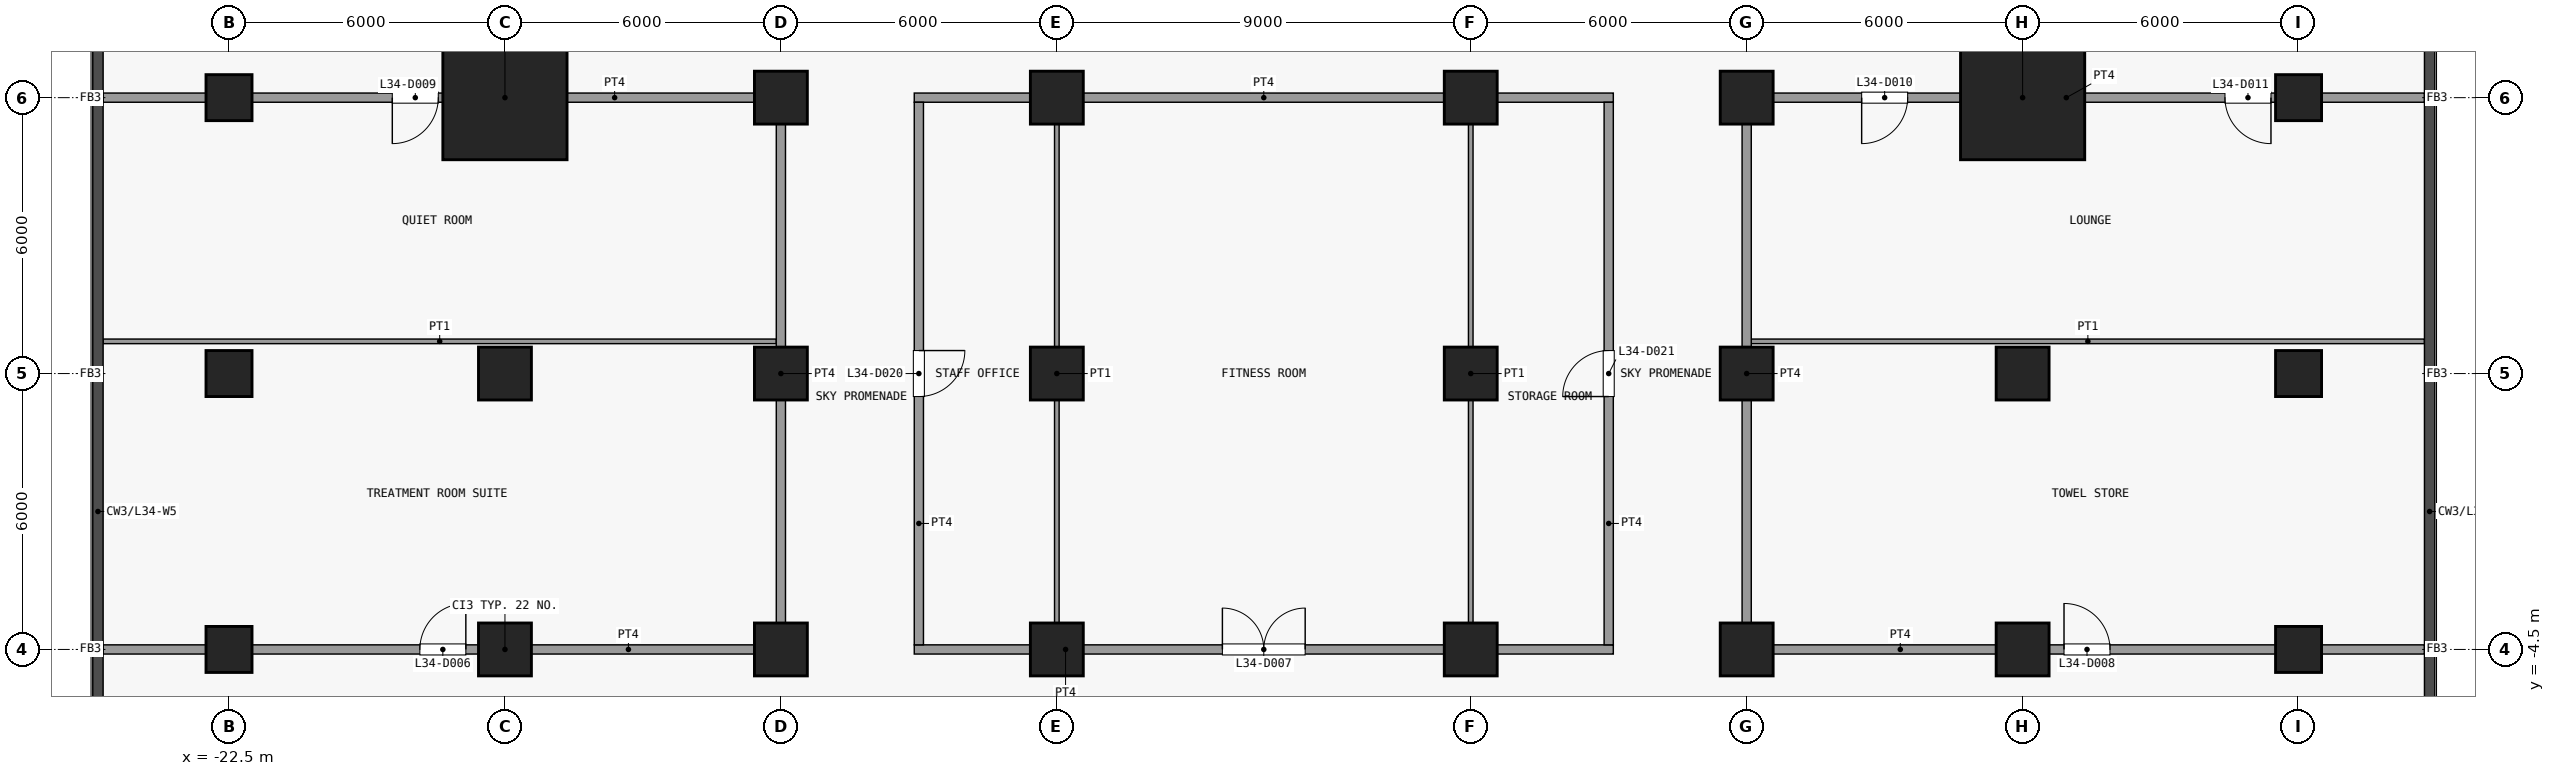
"""IFC4 building model, lengths in metres.
Left out: names, types, materials, properties, quantities, classifications, styles, units other than length and angle.
Written with IfcOpenShell. Run it as: python <this file> out.ifc"""

import sys

from ifc_helpers import new_model, si_unit, direction, frame, frame_2d, origin, origin_2d, place, context, subcontext, project, spatial, rectangle, extrude, element, fill, save


model = new_model("IFC4")
c1 = context("Model", 3, precision=1e-05, world=origin(), true_north=direction((0.0, 1.0)))
c2 = subcontext(c1, "Body", "Model", "MODEL_VIEW")
j1 = project(units=[si_unit("LENGTHUNIT", "METRE"), si_unit("PLANEANGLEUNIT", "RADIAN")], contexts=[c1])
p1 = place(None, origin())
s1 = spatial("IfcSite", under=j1, at=p1, CompositionType="ELEMENT")
p2 = place(p1, origin())
s2 = spatial("IfcBuilding", under=s1, at=p2, CompositionType="ELEMENT")
p3 = place(p2, frame((0.0, 0.0, 138.9)))
s3 = spatial("IfcBuildingStorey", under=s2, at=p3, CompositionType="ELEMENT", Elevation=138.9)
for number, where, z_axis, x_axis in (
    (1, (-22.5, -4.5, 0.0), (0.0, 0.0, 1.0), (1.0, 0.0, 0.0)),
    (2, (-22.5, 1.5, 0.0), (0.0, 0.0, 1.0), (1.0, 0.0, 0.0)),
    (3, (-22.5, 7.5, 0.0), (0.0, 0.0, 1.0), (1.0, 0.0, 0.0)),
):
    element("IfcColumn", number, at=place(p3, frame(where, z_axis=z_axis, x_axis=x_axis)), inside=s3, PredefinedType="COLUMN", context=c2, shape_type="SweptSolid", body=[
        extrude(rectangle(XDim=1.0, YDim=1.0, at=origin_2d()), origin(), (0.0, 0.0, 1.0), 5.0),
    ])
for number, where, z_axis, x_axis in (
    (4, (-16.5, -4.5, 0.0), (0.0, 0.0, 1.0), (1.0, 0.0, 0.0)),
    (5, (-16.5, 1.5, 0.0), (0.0, 0.0, 1.0), (1.0, 0.0, 0.0)),
):
    element("IfcColumn", number, at=place(p3, frame(where, z_axis=z_axis, x_axis=x_axis)), inside=s3, PredefinedType="COLUMN", context=c2, shape_type="SweptSolid", body=[
        extrude(rectangle(XDim=1.15, YDim=1.15, at=origin_2d()), origin(), (0.0, 0.0, 1.0), 5.0),
    ])
p4 = place(p3, frame((-16.5, 7.5, 0.0), z_axis=(0.0, 0.0, 1.0), x_axis=(1.0, 0.0, 0.0)))
e6 = element("IfcColumn", 6, at=p4, inside=s3, PredefinedType="COLUMN", context=c2, shape_type="SweptSolid", body=[
    extrude(rectangle(XDim=2.7, YDim=2.7, at=origin_2d()), origin(), (0.0, 0.0, 1.0), 5.0),
])
for number, where, z_axis, x_axis in (
    (7, (-10.5, -4.5, 0.0), (0.0, 0.0, 1.0), (1.0, 0.0, 0.0)),
    (8, (-10.5, 1.5, 0.0), (0.0, 0.0, 1.0), (1.0, 0.0, 0.0)),
    (9, (-10.5, 7.5, 0.0), (0.0, 0.0, 1.0), (1.0, 0.0, 0.0)),
    (10, (-4.5, -4.5, 0.0), (0.0, 0.0, 1.0), (1.0, 0.0, 0.0)),
    (11, (-4.5, 1.5, 0.0), (0.0, 0.0, 1.0), (1.0, 0.0, 0.0)),
    (12, (-4.5, 7.5, 0.0), (0.0, 0.0, 1.0), (1.0, 0.0, 0.0)),
    (13, (4.5, -4.5, 0.0), (0.0, 0.0, 1.0), (1.0, 0.0, 0.0)),
    (14, (4.5, 1.5, 0.0), (0.0, 0.0, 1.0), (1.0, 0.0, 0.0)),
    (15, (4.5, 7.5, 0.0), (0.0, 0.0, 1.0), (1.0, 0.0, 0.0)),
    (16, (10.5, -4.5, 0.0), (0.0, 0.0, 1.0), (1.0, 0.0, 0.0)),
    (17, (10.5, 1.5, 0.0), (0.0, 0.0, 1.0), (1.0, 0.0, 0.0)),
    (18, (10.5, 7.5, 0.0), (0.0, 0.0, 1.0), (1.0, 0.0, 0.0)),
    (19, (16.5, -4.5, 0.0), (0.0, 0.0, 1.0), (1.0, 0.0, 0.0)),
    (20, (16.5, 1.5, 0.0), (0.0, 0.0, 1.0), (1.0, 0.0, 0.0)),
):
    element("IfcColumn", number, at=place(p3, frame(where, z_axis=z_axis, x_axis=x_axis)), inside=s3, PredefinedType="COLUMN", context=c2, shape_type="SweptSolid", body=[
        extrude(rectangle(XDim=1.15, YDim=1.15, at=origin_2d()), origin(), (0.0, 0.0, 1.0), 5.0),
    ])
p5 = place(p3, frame((16.5, 7.5, 0.0), z_axis=(0.0, 0.0, 1.0), x_axis=(1.0, 0.0, 0.0)))
e21 = element("IfcColumn", 21, at=p5, inside=s3, PredefinedType="COLUMN", context=c2, shape_type="SweptSolid", body=[
    extrude(rectangle(XDim=2.7, YDim=2.7, at=origin_2d()), origin(), (0.0, 0.0, 1.0), 5.0),
])
for number, where, z_axis, x_axis in (
    (22, (22.5, -4.5, 0.0), (0.0, 0.0, 1.0), (1.0, 0.0, 0.0)),
    (23, (22.5, 1.5, 0.0), (0.0, 0.0, 1.0), (1.0, 0.0, 0.0)),
    (24, (22.5, 7.5, 0.0), (0.0, 0.0, 1.0), (1.0, 0.0, 0.0)),
):
    element("IfcColumn", number, at=place(p3, frame(where, z_axis=z_axis, x_axis=x_axis)), inside=s3, PredefinedType="COLUMN", context=c2, shape_type="SweptSolid", body=[
        extrude(rectangle(XDim=1.0, YDim=1.0, at=origin_2d()), origin(), (0.0, 0.0, 1.0), 5.0),
    ])
p6 = place(p3, frame((-25.238, -4.5, 0.0), z_axis=(0.0, 0.0, 1.0), x_axis=(1.0, 0.0, 0.0)))
e25 = element("IfcWall", 25, at=p6, inside=s3, PredefinedType="PARTITIONING", context=c2, shape_type="SweptSolid", body=[
    extrude(rectangle(XDim=14.838, YDim=0.2, at=frame_2d((7.419, 0.0))), origin(), (0.0, 0.0, 1.0), 4.55),
])
p7 = place(p6, frame((6.887, 0.0, 0.0)))
e26 = element("IfcOpeningElement", 26, at=p7, cuts=e25, PredefinedType="OPENING", context=c2, shape_type="SweptSolid", body=[
    extrude(rectangle(XDim=1.0, YDim=2.1, at=frame_2d((0.5, 1.05))), frame((0.0, 0.11, 0.0), z_axis=(0.0, -1.0, 0.0), x_axis=(1.0, 0.0, 0.0)), (0.0, 0.0, 1.0), 0.22),
])
p8 = place(p3, frame((-7.6, -4.5, 0.0), z_axis=(0.0, 0.0, 1.0), x_axis=(1.0, 0.0, 0.0)))
e27 = element("IfcWall", 27, at=p8, inside=s3, PredefinedType="PARTITIONING", context=c2, shape_type="SweptSolid", body=[
    extrude(rectangle(XDim=15.2, YDim=0.2, at=frame_2d((7.6, 0.0))), origin(), (0.0, 0.0, 1.0), 4.55),
])
p9 = place(p8, frame((6.7, 0.0, 0.0)))
e28 = element("IfcOpeningElement", 28, at=p9, cuts=e27, PredefinedType="OPENING", context=c2, shape_type="SweptSolid", body=[
    extrude(rectangle(XDim=1.8, YDim=2.1, at=frame_2d((0.9, 1.05))), frame((0.0, 0.11, 0.0), z_axis=(0.0, -1.0, 0.0), x_axis=(1.0, 0.0, 0.0)), (0.0, 0.0, 1.0), 0.22),
])
p10 = place(p3, frame((10.4, -4.5, 0.0), z_axis=(0.0, 0.0, 1.0), x_axis=(1.0, 0.0, 0.0)))
e29 = element("IfcWall", 29, at=p10, inside=s3, PredefinedType="PARTITIONING", context=c2, shape_type="SweptSolid", body=[
    extrude(rectangle(XDim=14.838, YDim=0.2, at=frame_2d((7.419, 0.0))), origin(), (0.0, 0.0, 1.0), 4.55),
])
p11 = place(p10, frame((7.0, 0.0, 0.0)))
e30 = element("IfcOpeningElement", 30, at=p11, cuts=e29, PredefinedType="OPENING", context=c2, shape_type="SweptSolid", body=[
    extrude(rectangle(XDim=1.0, YDim=2.1, at=frame_2d((0.5, 1.05))), frame((0.0, 0.11, 0.0), z_axis=(0.0, -1.0, 0.0), x_axis=(1.0, 0.0, 0.0)), (0.0, 0.0, 1.0), 0.22),
])
for number, where, z_axis, x_axis in (
    (31, (-25.238, 2.2, 0.0), (0.0, 0.0, 1.0), (1.0, 0.0, 0.0)),
    (32, (10.6, 2.2, 0.0), (0.0, 0.0, 1.0), (1.0, 0.0, 0.0)),
):
    element("IfcWall", number, at=place(p3, frame(where, z_axis=z_axis, x_axis=x_axis)), inside=s3, PredefinedType="PARTITIONING", context=c2, shape_type="SweptSolid", body=[
        extrude(rectangle(XDim=14.637, YDim=0.1, at=frame_2d((7.319, 0.0))), origin(), (0.0, 0.0, 1.0), 4.55),
    ])
p12 = place(p3, frame((-25.238, 7.5, 0.0), z_axis=(0.0, 0.0, 1.0), x_axis=(1.0, 0.0, 0.0)))
e33 = element("IfcWall", 33, at=p12, inside=s3, PredefinedType="PARTITIONING", context=c2, shape_type="SweptSolid", body=[
    extrude(rectangle(XDim=14.838, YDim=0.2, at=frame_2d((7.419, 0.0))), origin(), (0.0, 0.0, 1.0), 4.55),
])
p13 = place(p12, frame((6.288, 0.0, 0.0)))
e34 = element("IfcOpeningElement", 34, at=p13, cuts=e33, PredefinedType="OPENING", context=c2, shape_type="SweptSolid", body=[
    extrude(rectangle(XDim=1.0, YDim=2.1, at=frame_2d((0.5, 1.05))), frame((0.0, 0.11, 0.0), z_axis=(0.0, -1.0, 0.0), x_axis=(1.0, 0.0, 0.0)), (0.0, 0.0, 1.0), 0.22),
])
p14 = place(p3, frame((-7.6, 7.5, 0.0), z_axis=(0.0, 0.0, 1.0), x_axis=(1.0, 0.0, 0.0)))
e35 = element("IfcWall", 35, at=p14, inside=s3, PredefinedType="PARTITIONING", context=c2, shape_type="SweptSolid", body=[
    extrude(rectangle(XDim=15.2, YDim=0.2, at=frame_2d((7.6, 0.0))), origin(), (0.0, 0.0, 1.0), 4.55),
])
p15 = place(p3, frame((10.4, 7.5, 0.0), z_axis=(0.0, 0.0, 1.0), x_axis=(1.0, 0.0, 0.0)))
e36 = element("IfcWall", 36, at=p15, inside=s3, PredefinedType="PARTITIONING", context=c2, shape_type="SweptSolid", body=[
    extrude(rectangle(XDim=14.838, YDim=0.2, at=frame_2d((7.419, 0.0))), origin(), (0.0, 0.0, 1.0), 4.55),
])
p16 = place(p15, frame((2.6, 0.0, 0.0)))
e37 = element("IfcOpeningElement", 37, at=p16, cuts=e36, PredefinedType="OPENING", context=c2, shape_type="SweptSolid", body=[
    extrude(rectangle(XDim=1.0, YDim=2.1, at=frame_2d((0.5, 1.05))), frame((0.0, 0.11, 0.0), z_axis=(0.0, -1.0, 0.0), x_axis=(1.0, 0.0, 0.0)), (0.0, 0.0, 1.0), 0.22),
])
p17 = place(p15, frame((10.5, 0.0, 0.0)))
e38 = element("IfcOpeningElement", 38, at=p17, cuts=e36, PredefinedType="OPENING", context=c2, shape_type="SweptSolid", body=[
    extrude(rectangle(XDim=1.0, YDim=2.1, at=frame_2d((0.5, 1.05))), frame((0.0, 0.11, 0.0), z_axis=(0.0, -1.0, 0.0), x_axis=(1.0, 0.0, 0.0)), (0.0, 0.0, 1.0), 0.22),
])
p18 = place(p3, frame((-10.5, -4.4, 0.0), z_axis=(0.0, 0.0, 1.0), x_axis=(0.0, 1.0, 0.0)))
e39 = element("IfcWall", 39, at=p18, inside=s3, PredefinedType="PARTITIONING", context=c2, shape_type="SweptSolid", body=[
    extrude(rectangle(XDim=11.8, YDim=0.2, at=frame_2d((5.9, 0.0))), origin(), (0.0, 0.0, 1.0), 4.55),
])
p19 = place(p3, frame((-7.5, -4.4, 0.0), z_axis=(0.0, 0.0, 1.0), x_axis=(0.0, 1.0, 0.0)))
e40 = element("IfcWall", 40, at=p19, inside=s3, PredefinedType="PARTITIONING", context=c2, shape_type="SweptSolid", body=[
    extrude(rectangle(XDim=11.8, YDim=0.2, at=frame_2d((5.9, 0.0))), origin(), (0.0, 0.0, 1.0), 4.55),
])
p20 = place(p19, frame((5.4, 0.0, 0.0)))
e41 = element("IfcOpeningElement", 41, at=p20, cuts=e40, PredefinedType="OPENING", context=c2, shape_type="SweptSolid", body=[
    extrude(rectangle(XDim=1.0, YDim=2.1, at=frame_2d((0.5, 1.05))), frame((0.0, 0.11, 0.0), z_axis=(0.0, -1.0, 0.0), x_axis=(1.0, 0.0, 0.0)), (0.0, 0.0, 1.0), 0.22),
])
for number, where, z_axis, x_axis in (
    (42, (-4.5, -4.4, 0.0), (0.0, 0.0, 1.0), (0.0, 1.0, 0.0)),
    (43, (4.5, -4.4, 0.0), (0.0, 0.0, 1.0), (0.0, 1.0, 0.0)),
):
    element("IfcWall", number, at=place(p3, frame(where, z_axis=z_axis, x_axis=x_axis)), inside=s3, PredefinedType="PARTITIONING", context=c2, shape_type="SweptSolid", body=[
        extrude(rectangle(XDim=11.8, YDim=0.1, at=frame_2d((5.9, 0.0))), origin(), (0.0, 0.0, 1.0), 4.55),
    ])
p21 = place(p3, frame((7.5, -4.4, 0.0), z_axis=(0.0, 0.0, 1.0), x_axis=(0.0, 1.0, 0.0)))
e44 = element("IfcWall", 44, at=p21, inside=s3, PredefinedType="PARTITIONING", context=c2, shape_type="SweptSolid", body=[
    extrude(rectangle(XDim=11.8, YDim=0.2, at=frame_2d((5.9, 0.0))), origin(), (0.0, 0.0, 1.0), 4.55),
])
p22 = place(p21, frame((5.4, 0.0, 0.0)))
e45 = element("IfcOpeningElement", 45, at=p22, cuts=e44, PredefinedType="OPENING", context=c2, shape_type="SweptSolid", body=[
    extrude(rectangle(XDim=1.0, YDim=2.1, at=frame_2d((0.5, 1.05))), frame((0.0, 0.11, 0.0), z_axis=(0.0, -1.0, 0.0), x_axis=(1.0, 0.0, 0.0)), (0.0, 0.0, 1.0), 0.22),
])
p23 = place(p3, frame((10.5, -4.4, 0.0), z_axis=(0.0, 0.0, 1.0), x_axis=(0.0, 1.0, 0.0)))
e46 = element("IfcWall", 46, at=p23, inside=s3, PredefinedType="PARTITIONING", context=c2, shape_type="SweptSolid", body=[
    extrude(rectangle(XDim=11.8, YDim=0.2, at=frame_2d((5.9, 0.0))), origin(), (0.0, 0.0, 1.0), 4.55),
])
p24 = place(p7, origin())
e47 = element("IfcDoor", 47, at=p24, inside=s3, OperationType="SINGLE_SWING_LEFT", PredefinedType="DOOR", context=c2, shape_type="SweptSolid", body=[
    extrude(rectangle(XDim=1.0, YDim=2.1, at=frame_2d((0.5, 1.05))), frame((0.0, 0.025, 0.0), z_axis=(0.0, -1.0, 0.0), x_axis=(1.0, 0.0, 0.0)), (0.0, 0.0, 1.0), 0.05),
])
fill(e26, e47)
p25 = place(p9, origin())
e48 = element("IfcDoor", 48, at=p25, inside=s3, OperationType="DOUBLE_DOOR_SINGLE_SWING", PredefinedType="DOOR", context=c2, shape_type="SweptSolid", body=[
    extrude(rectangle(XDim=1.8, YDim=2.1, at=frame_2d((0.9, 1.05))), frame((0.0, 0.025, 0.0), z_axis=(0.0, -1.0, 0.0), x_axis=(1.0, 0.0, 0.0)), (0.0, 0.0, 1.0), 0.05),
])
fill(e28, e48)
p26 = place(p11, origin())
e49 = element("IfcDoor", 49, at=p26, inside=s3, OperationType="SINGLE_SWING_RIGHT", PredefinedType="DOOR", context=c2, shape_type="SweptSolid", body=[
    extrude(rectangle(XDim=1.0, YDim=2.1, at=frame_2d((0.5, 1.05))), frame((0.0, 0.025, 0.0), z_axis=(0.0, -1.0, 0.0), x_axis=(1.0, 0.0, 0.0)), (0.0, 0.0, 1.0), 0.05),
])
fill(e30, e49)
p27 = place(p13, origin())
e50 = element("IfcDoor", 50, at=p27, inside=s3, OperationType="SINGLE_SWING_LEFT", PredefinedType="DOOR", context=c2, shape_type="SweptSolid", body=[
    extrude(rectangle(XDim=1.0, YDim=2.1, at=frame_2d((0.5, 1.05))), frame((0.0, 0.025, 0.0), z_axis=(0.0, -1.0, 0.0), x_axis=(1.0, 0.0, 0.0)), (0.0, 0.0, 1.0), 0.05),
])
fill(e34, e50)
p28 = place(p16, origin())
e51 = element("IfcDoor", 51, at=p28, inside=s3, OperationType="SINGLE_SWING_LEFT", PredefinedType="DOOR", context=c2, shape_type="SweptSolid", body=[
    extrude(rectangle(XDim=1.0, YDim=2.1, at=frame_2d((0.5, 1.05))), frame((0.0, 0.025, 0.0), z_axis=(0.0, -1.0, 0.0), x_axis=(1.0, 0.0, 0.0)), (0.0, 0.0, 1.0), 0.05),
])
fill(e37, e51)
p29 = place(p17, origin())
e52 = element("IfcDoor", 52, at=p29, inside=s3, OperationType="SINGLE_SWING_RIGHT", PredefinedType="DOOR", context=c2, shape_type="SweptSolid", body=[
    extrude(rectangle(XDim=1.0, YDim=2.1, at=frame_2d((0.5, 1.05))), frame((0.0, 0.025, 0.0), z_axis=(0.0, -1.0, 0.0), x_axis=(1.0, 0.0, 0.0)), (0.0, 0.0, 1.0), 0.05),
])
fill(e38, e52)
p30 = place(p20, origin())
e53 = element("IfcDoor", 53, at=p30, inside=s3, OperationType="SINGLE_SWING_RIGHT", PredefinedType="DOOR", context=c2, shape_type="SweptSolid", body=[
    extrude(rectangle(XDim=1.0, YDim=2.1, at=frame_2d((0.5, 1.05))), frame((0.0, 0.025, 0.0), z_axis=(0.0, -1.0, 0.0), x_axis=(1.0, 0.0, 0.0)), (0.0, 0.0, 1.0), 0.05),
])
fill(e41, e53)
p31 = place(p22, origin())
e54 = element("IfcDoor", 54, at=p31, inside=s3, OperationType="SINGLE_SWING_RIGHT", PredefinedType="DOOR", context=c2, shape_type="SweptSolid", body=[
    extrude(rectangle(XDim=1.0, YDim=2.1, at=frame_2d((0.5, 1.05))), frame((0.0, 0.025, 0.0), z_axis=(0.0, -1.0, 0.0), x_axis=(1.0, 0.0, 0.0)), (0.0, 0.0, 1.0), 0.05),
])
fill(e45, e54)
save(model, sys.argv[1])
